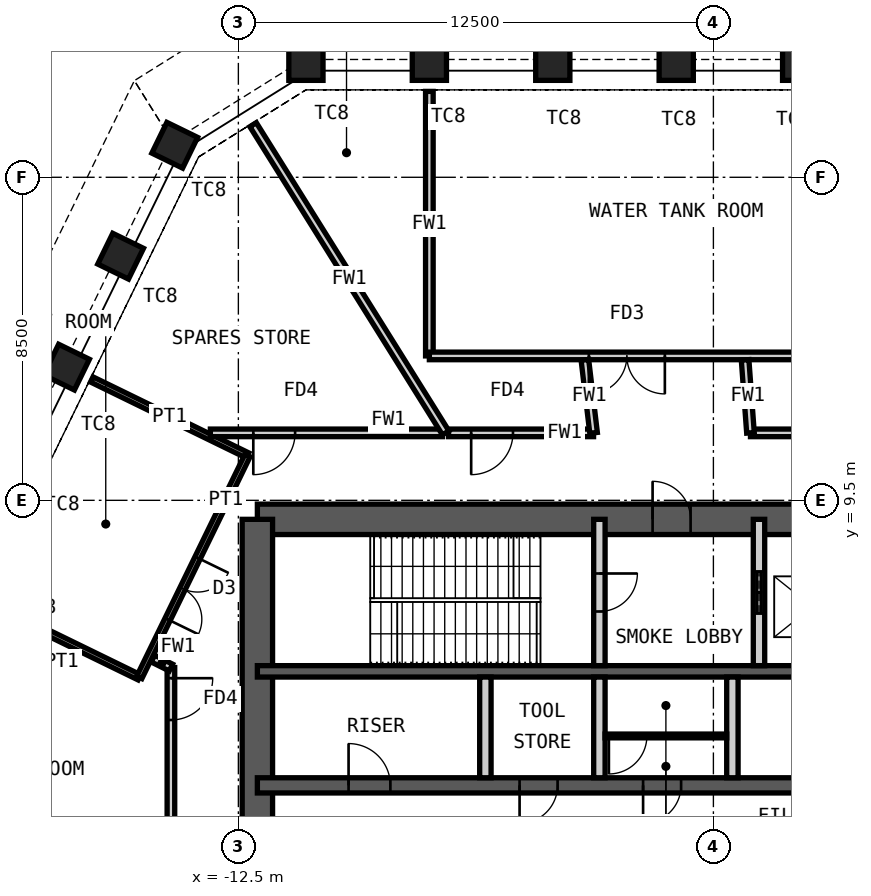
"""IFC4 building model, lengths in metres.
Left out: names, types, materials, properties, quantities, classifications, styles, units other than length and angle.
Written with IfcOpenShell. Run it as: python <this file> out.ifc"""

import sys

from ifc_helpers import new_model, si_unit, direction, frame, frame_2d, origin, origin_2d, place, context, subcontext, project, spatial, rectangle, hollow_rectangle, extrude, element, fill, save


model = new_model("IFC4")
c1 = context("Model", 3, precision=1e-05, world=origin(), true_north=direction((0.0, 1.0)))
c2 = subcontext(c1, "Body", "Model", "MODEL_VIEW")
j1 = project(units=[si_unit("LENGTHUNIT", "METRE"), si_unit("PLANEANGLEUNIT", "RADIAN")], contexts=[c1])
p1 = place(None, origin())
s1 = spatial("IfcSite", under=j1, at=p1, CompositionType="ELEMENT")
p2 = place(p1, origin())
s2 = spatial("IfcBuilding", under=s1, at=p2, CompositionType="ELEMENT")
p3 = place(p2, frame((0.0, 0.0, 337.6)))
s3 = spatial("IfcBuildingStorey", under=s2, at=p3, CompositionType="ELEMENT", Elevation=337.6)
for number, where, z_axis, x_axis in (
    (1, (-10.722, 21.0, 0.0), (0.0, 0.0, 1.0), (-1.0, 0.0, 0.0)),
    (2, (-7.474, 21.0, 0.0), (0.0, 0.0, 1.0), (-1.0, 0.0, 0.0)),
    (3, (-4.226, 21.0, 0.0), (0.0, 0.0, 1.0), (-1.0, 0.0, 0.0)),
    (4, (-0.978, 21.0, 0.0), (0.0, 0.0, 1.0), (-1.0, 0.0, 0.0)),
    (5, (2.27, 21.0, 0.0), (0.0, 0.0, 1.0), (-1.0, 0.0, 0.0)),
    (6, (-17.022, 13.004, 0.0), (0.0, 0.0, 1.0), (-0.438, -0.899, 0.0)),
    (7, (-15.598, 15.924, 0.0), (0.0, 0.0, 1.0), (-0.438, -0.899, 0.0)),
    (8, (-14.174, 18.843, 0.0), (0.0, 0.0, 1.0), (-0.438, -0.899, 0.0)),
):
    element("IfcColumn", number, at=place(p3, frame(where, z_axis=z_axis, x_axis=x_axis)), inside=s3, PredefinedType="COLUMN", context=c2, shape_type="SweptSolid", body=[
        extrude(hollow_rectangle(XDim=0.9, YDim=0.9, WallThickness=0.05, at=origin_2d()), origin(), (0.0, 0.0, 1.0), 6.0),
    ])
p4 = place(p3, frame((-12.0, 9.0, 0.0), z_axis=(0.0, 0.0, 1.0), x_axis=(1.0, 0.0, 0.0)))
e9 = element("IfcWall", 9, at=p4, inside=s3, PredefinedType="SHEAR", context=c2, shape_type="SweptSolid", body=[
    extrude(rectangle(XDim=24.0, YDim=0.8, at=frame_2d((12.0, 0.0))), origin(), (0.0, 0.0, 1.0), 6.0),
])
p5 = place(p4, frame((10.4, 0.0, 0.0)))
e10 = element("IfcOpeningElement", 10, at=p5, cuts=e9, PredefinedType="OPENING", context=c2, shape_type="SweptSolid", body=[
    extrude(rectangle(XDim=1.0, YDim=2.1, at=frame_2d((0.5, 1.05))), frame((0.0, 0.41, 0.0), z_axis=(0.0, -1.0, 0.0), x_axis=(1.0, 0.0, 0.0)), (0.0, 0.0, 1.0), 0.82),
])
p6 = place(p4, frame((17.6, 0.0, 0.0)))
e11 = element("IfcOpeningElement", 11, at=p6, cuts=e9, PredefinedType="OPENING", context=c2, shape_type="SweptSolid", body=[
    extrude(rectangle(XDim=0.9, YDim=2.1, at=frame_2d((0.45, 1.05))), frame((0.0, 0.41, 0.0), z_axis=(0.0, -1.0, 0.0), x_axis=(1.0, 0.0, 0.0)), (0.0, 0.0, 1.0), 0.82),
])
p7 = place(p4, frame((21.9, 0.0, 0.0)))
e12 = element("IfcOpeningElement", 12, at=p7, cuts=e9, PredefinedType="OPENING", context=c2, shape_type="SweptSolid", body=[
    extrude(rectangle(XDim=0.9, YDim=2.1, at=frame_2d((0.45, 1.05))), frame((0.0, 0.41, 0.0), z_axis=(0.0, -1.0, 0.0), x_axis=(1.0, 0.0, 0.0)), (0.0, 0.0, 1.0), 0.82),
])
p8 = place(p3, frame((-12.0, -9.0, 0.0), z_axis=(0.0, 0.0, 1.0), x_axis=(0.0, 1.0, 0.0)))
e13 = element("IfcWall", 13, at=p8, inside=s3, PredefinedType="SHEAR", context=c2, shape_type="SweptSolid", body=[
    extrude(rectangle(XDim=18.0, YDim=0.8, at=frame_2d((9.0, 0.0))), origin(), (0.0, 0.0, 1.0), 6.0),
])
p9 = place(p8, frame((8.1, 0.0, 0.0)))
e14 = element("IfcOpeningElement", 14, at=p9, cuts=e13, PredefinedType="OPENING", context=c2, shape_type="SweptSolid", body=[
    extrude(rectangle(XDim=1.8, YDim=2.1, at=frame_2d((0.9, 1.05))), frame((0.0, 0.41, 0.0), z_axis=(0.0, -1.0, 0.0), x_axis=(1.0, 0.0, 0.0)), (0.0, 0.0, 1.0), 0.82),
])
p10 = place(p3, frame((-12.0, 5.0, 0.0), z_axis=(0.0, 0.0, 1.0), x_axis=(1.0, 0.0, 0.0)))
e15 = element("IfcWall", 15, at=p10, inside=s3, PredefinedType="SHEAR", context=c2, shape_type="SweptSolid", body=[
    extrude(rectangle(XDim=24.0, YDim=0.3, at=frame_2d((12.0, 0.0))), origin(), (0.0, 0.0, 1.0), 6.0),
])
p11 = place(p3, frame((-12.0, 2.0, 0.0), z_axis=(0.0, 0.0, 1.0), x_axis=(1.0, 0.0, 0.0)))
e16 = element("IfcWall", 16, at=p11, inside=s3, PredefinedType="SHEAR", context=c2, shape_type="SweptSolid", body=[
    extrude(rectangle(XDim=24.0, YDim=0.4, at=frame_2d((12.0, 0.0))), origin(), (0.0, 0.0, 1.0), 6.0),
])
p12 = place(p11, frame((2.4, 0.0, 0.0)))
e17 = element("IfcOpeningElement", 17, at=p12, cuts=e16, PredefinedType="OPENING", context=c2, shape_type="SweptSolid", body=[
    extrude(rectangle(XDim=1.1, YDim=2.1, at=frame_2d((0.55, 1.05))), frame((0.0, 0.21, 0.0), z_axis=(0.0, -1.0, 0.0), x_axis=(1.0, 0.0, 0.0)), (0.0, 0.0, 1.0), 0.42),
])
p13 = place(p11, frame((22.0, 0.0, 0.0)))
e18 = element("IfcOpeningElement", 18, at=p13, cuts=e16, PredefinedType="OPENING", context=c2, shape_type="SweptSolid", body=[
    extrude(rectangle(XDim=1.1, YDim=2.1, at=frame_2d((0.55, 1.05))), frame((0.0, 0.21, 0.0), z_axis=(0.0, -1.0, 0.0), x_axis=(1.0, 0.0, 0.0)), (0.0, 0.0, 1.0), 0.42),
])
p14 = place(p11, frame((10.15, 0.0, 0.0)))
e19 = element("IfcOpeningElement", 19, at=p14, cuts=e16, PredefinedType="OPENING", context=c2, shape_type="SweptSolid", body=[
    extrude(rectangle(XDim=1.0, YDim=2.1, at=frame_2d((0.5, 1.05))), frame((0.0, 0.21, 0.0), z_axis=(0.0, -1.0, 0.0), x_axis=(1.0, 0.0, 0.0)), (0.0, 0.0, 1.0), 0.42),
])
p15 = place(p11, frame((6.9, 0.0, 0.0)))
e20 = element("IfcOpeningElement", 20, at=p15, cuts=e16, PredefinedType="OPENING", context=c2, shape_type="SweptSolid", body=[
    extrude(rectangle(XDim=1.0, YDim=2.1, at=frame_2d((0.5, 1.05))), frame((0.0, 0.21, 0.0), z_axis=(0.0, -1.0, 0.0), x_axis=(1.0, 0.0, 0.0)), (0.0, 0.0, 1.0), 0.42),
])
p16 = place(p11, frame((19.0, 0.0, 0.0)))
e21 = element("IfcOpeningElement", 21, at=p16, cuts=e16, PredefinedType="OPENING", context=c2, shape_type="SweptSolid", body=[
    extrude(rectangle(XDim=1.0, YDim=2.1, at=frame_2d((0.5, 1.05))), frame((0.0, 0.21, 0.0), z_axis=(0.0, -1.0, 0.0), x_axis=(1.0, 0.0, 0.0)), (0.0, 0.0, 1.0), 0.42),
])
p17 = place(p3, frame((-3.0, 5.15, 0.0), z_axis=(0.0, 0.0, 1.0), x_axis=(0.0, 1.0, 0.0)))
e22 = element("IfcWall", 22, at=p17, inside=s3, PredefinedType="PARTITIONING", context=c2, shape_type="SweptSolid", body=[
    extrude(rectangle(XDim=3.85, YDim=0.3, at=frame_2d((1.925, 0.0))), origin(), (0.0, 0.0, 1.0), 5.78),
])
p18 = place(p17, frame((1.425, 0.0, 0.0)))
e23 = element("IfcOpeningElement", 23, at=p18, cuts=e22, PredefinedType="OPENING", context=c2, shape_type="SweptSolid", body=[
    extrude(rectangle(XDim=1.0, YDim=2.1, at=frame_2d((0.5, 1.05))), frame((0.0, 0.16, 0.0), z_axis=(0.0, -1.0, 0.0), x_axis=(1.0, 0.0, 0.0)), (0.0, 0.0, 1.0), 0.32),
])
p19 = place(p3, frame((1.2, 5.15, 0.0), z_axis=(0.0, 0.0, 1.0), x_axis=(0.0, 1.0, 0.0)))
e24 = element("IfcWall", 24, at=p19, inside=s3, PredefinedType="PARTITIONING", context=c2, shape_type="SweptSolid", body=[
    extrude(rectangle(XDim=3.85, YDim=0.3, at=frame_2d((1.925, 0.0))), origin(), (0.0, 0.0, 1.0), 5.78),
])
p20 = place(p19, frame((1.375, 0.0, 0.0)))
e25 = element("IfcOpeningElement", 25, at=p20, cuts=e24, PredefinedType="OPENING", context=c2, shape_type="SweptSolid", body=[
    extrude(rectangle(XDim=1.1, YDim=2.4, at=frame_2d((0.55, 1.2))), frame((0.0, 0.16, 0.0), z_axis=(0.0, -1.0, 0.0), x_axis=(1.0, 0.0, 0.0)), (0.0, 0.0, 1.0), 0.32),
])
for number, where, z_axis, x_axis in (
    (26, (-6.0, 2.2, 0.0), (0.0, 0.0, 1.0), (0.0, 1.0, 0.0)),
    (27, (-3.0, 2.2, 0.0), (0.0, 0.0, 1.0), (0.0, 1.0, 0.0)),
    (28, (0.5, 2.2, 0.0), (0.0, 0.0, 1.0), (0.0, 1.0, 0.0)),
):
    element("IfcWall", number, at=place(p3, frame(where, z_axis=z_axis, x_axis=x_axis)), inside=s3, PredefinedType="PARTITIONING", context=c2, shape_type="SweptSolid", body=[
        extrude(rectangle(XDim=2.65, YDim=0.3, at=frame_2d((1.325, 0.0))), origin(), (0.0, 0.0, 1.0), 5.78),
    ])
p21 = place(p3, frame((-2.85, 3.3, 0.0), z_axis=(0.0, 0.0, 1.0), x_axis=(1.0, 0.0, 0.0)))
e29 = element("IfcWall", 29, at=p21, inside=s3, PredefinedType="PARTITIONING", context=c2, shape_type="SweptSolid", body=[
    extrude(rectangle(XDim=3.2, YDim=0.1, at=frame_2d((1.6, 0.0))), origin(), (0.0, 0.0, 1.0), 5.78),
])
p22 = place(p21, frame((0.1, 0.0, 0.0)))
e30 = element("IfcOpeningElement", 30, at=p22, cuts=e29, PredefinedType="OPENING", context=c2, shape_type="SweptSolid", body=[
    extrude(rectangle(XDim=1.0, YDim=2.4, at=frame_2d((0.5, 1.2))), frame((0.0, 0.06, 0.0), z_axis=(0.0, -1.0, 0.0), x_axis=(1.0, 0.0, 0.0)), (0.0, 0.0, 1.0), 0.12),
])
p23 = place(p3, frame((-7.474, 20.26, 0.0), z_axis=(0.0, 0.0, 1.0), x_axis=(0.0, -1.0, 0.0)))
e31 = element("IfcWall", 31, at=p23, inside=s3, PredefinedType="PARTITIONING", context=c2, shape_type="SweptSolid", body=[
    extrude(rectangle(XDim=6.96, YDim=0.2, at=frame_2d((3.48, 0.0))), origin(), (0.0, 0.0, 1.0), 5.75),
])
p24 = place(p3, frame((-7.474, 13.3, 0.0), z_axis=(0.0, 0.0, 1.0), x_axis=(1.0, 0.0, 0.0)))
e32 = element("IfcWall", 32, at=p24, inside=s3, PredefinedType="PARTITIONING", context=c2, shape_type="SweptSolid", body=[
    extrude(rectangle(XDim=12.992, YDim=0.2, at=frame_2d((6.496, 0.0))), origin(), (0.0, 0.0, 1.0), 5.75),
])
p25 = place(p24, frame((4.197, 0.0, 0.0)))
e33 = element("IfcOpeningElement", 33, at=p25, cuts=e32, PredefinedType="OPENING", context=c2, shape_type="SweptSolid", body=[
    extrude(rectangle(XDim=2.0, YDim=2.4, at=frame_2d((1.0, 1.2))), frame((0.0, 0.11, 0.0), z_axis=(0.0, -1.0, 0.0), x_axis=(1.0, 0.0, 0.0)), (0.0, 0.0, 1.0), 0.22),
])
p26 = place(p3, frame((-19.205, 6.841, 0.0), z_axis=(0.0, 0.0, 1.0), x_axis=(0.898784911103, -0.438389876221, 0.0)))
e34 = element("IfcWall", 34, at=p26, inside=s3, PredefinedType="PARTITIONING", context=c2, shape_type="SweptSolid", body=[
    extrude(rectangle(XDim=4.56, YDim=0.15, at=frame_2d((2.28, 0.0))), origin(), (0.0, 0.0, 1.0), 4.65),
])
p27 = place(p3, frame((-16.357, 12.68, 0.0), z_axis=(0.0, 0.0, 1.0), x_axis=(0.898795200085, -0.438368781171, 0.0)))
e35 = element("IfcWall", 35, at=p27, inside=s3, PredefinedType="PARTITIONING", context=c2, shape_type="SweptSolid", body=[
    extrude(rectangle(XDim=4.56, YDim=0.15, at=frame_2d((2.28, 0.0))), origin(), (0.0, 0.0, 1.0), 4.85),
])
p28 = place(p3, frame((-15.106, 4.842, 0.0), z_axis=(0.0, 0.0, 1.0), x_axis=(0.438397716114, 0.898781087087, 0.0)))
e36 = element("IfcWall", 36, at=p28, inside=s3, PredefinedType="PARTITIONING", context=c2, shape_type="SweptSolid", body=[
    extrude(rectangle(XDim=6.496, YDim=0.15, at=frame_2d((3.248, 0.0))), origin(), (0.0, 0.0, 1.0), 5.75),
])
p29 = place(p28, frame((1.698, 0.0, 0.0)))
e37 = element("IfcOpeningElement", 37, at=p29, cuts=e36, PredefinedType="OPENING", context=c2, shape_type="SweptSolid", body=[
    extrude(rectangle(XDim=1.8, YDim=2.4, at=frame_2d((0.9, 1.2))), frame((0.0, 0.085, 0.0), z_axis=(0.0, -1.0, 0.0), x_axis=(1.0, 0.0, 0.0)), (0.0, 0.0, 1.0), 0.17),
])
p30 = place(p3, frame((0.976, 11.275, 0.0), z_axis=(0.0, 0.0, 1.0), x_axis=(1.0, 0.0, 0.0)))
e38 = element("IfcWall", 38, at=p30, inside=s3, PredefinedType="PARTITIONING", context=c2, shape_type="SweptSolid", body=[
    extrude(rectangle(XDim=4.946, YDim=0.2, at=frame_2d((2.473, 0.0))), origin(), (0.0, 0.0, 1.0), 5.75),
])
p31 = place(p30, frame((1.428, 0.0, 0.0)))
e39 = element("IfcOpeningElement", 39, at=p31, cuts=e38, PredefinedType="OPENING", context=c2, shape_type="SweptSolid", body=[
    extrude(rectangle(XDim=1.1, YDim=2.1, at=frame_2d((0.55, 1.05))), frame((0.0, 0.11, 0.0), z_axis=(0.0, -1.0, 0.0), x_axis=(1.0, 0.0, 0.0)), (0.0, 0.0, 1.0), 0.22),
])
p32 = place(p3, frame((0.834, 13.195, 0.0), z_axis=(0.0, 0.0, 1.0), x_axis=(0.073292493621, -0.997310488453, 0.0)))
e40 = element("IfcWall", 40, at=p32, inside=s3, PredefinedType="PARTITIONING", context=c2, shape_type="SweptSolid", body=[
    extrude(rectangle(XDim=1.925, YDim=0.2, at=frame_2d((0.963, 0.0))), origin(), (0.0, 0.0, 1.0), 4.65),
])
p33 = place(p3, frame((-6.969, 11.275, 0.0), z_axis=(0.0, 0.0, 1.0), x_axis=(1.0, 0.0, 0.0)))
e41 = element("IfcWall", 41, at=p33, inside=s3, PredefinedType="PARTITIONING", context=c2, shape_type="SweptSolid", body=[
    extrude(rectangle(XDim=3.816, YDim=0.2, at=frame_2d((1.908, 0.0))), origin(), (0.0, 0.0, 1.0), 5.75),
])
p34 = place(p33, frame((0.595, 0.0, 0.0)))
e42 = element("IfcOpeningElement", 42, at=p34, cuts=e41, PredefinedType="OPENING", context=c2, shape_type="SweptSolid", body=[
    extrude(rectangle(XDim=1.1, YDim=2.1, at=frame_2d((0.55, 1.05))), frame((0.0, 0.11, 0.0), z_axis=(0.0, -1.0, 0.0), x_axis=(1.0, 0.0, 0.0)), (0.0, 0.0, 1.0), 0.22),
])
p35 = place(p3, frame((-3.153, 11.275, 0.0), z_axis=(0.0, 0.0, 1.0), x_axis=(-0.118049862702, 0.993007668609, 0.0)))
e43 = element("IfcWall", 43, at=p35, inside=s3, PredefinedType="PARTITIONING", context=c2, shape_type="SweptSolid", body=[
    extrude(rectangle(XDim=1.934, YDim=0.2, at=frame_2d((0.967, 0.0))), origin(), (0.0, 0.0, 1.0), 4.85),
])
p36 = place(p3, frame((-13.237, 11.275, 0.0), z_axis=(0.0, 0.0, 1.0), x_axis=(1.0, 0.0, 0.0)))
e44 = element("IfcWall", 44, at=p36, inside=s3, PredefinedType="PARTITIONING", context=c2, shape_type="SweptSolid", body=[
    extrude(rectangle(XDim=6.109, YDim=0.2, at=frame_2d((3.054, 0.0))), origin(), (0.0, 0.0, 1.0), 5.75),
])
p37 = place(p36, frame((1.13, 0.0, 0.0)))
e45 = element("IfcOpeningElement", 45, at=p37, cuts=e44, PredefinedType="OPENING", context=c2, shape_type="SweptSolid", body=[
    extrude(rectangle(XDim=1.1, YDim=2.1, at=frame_2d((0.55, 1.05))), frame((0.0, 0.11, 0.0), z_axis=(0.0, -1.0, 0.0), x_axis=(1.0, 0.0, 0.0)), (0.0, 0.0, 1.0), 0.22),
])
p38 = place(p3, frame((-14.275, -0.432, 0.0), z_axis=(0.0, 0.0, 1.0), x_axis=(0.0, 1.0, 0.0)))
e46 = element("IfcWall", 46, at=p38, inside=s3, PredefinedType="PARTITIONING", context=c2, shape_type="SweptSolid", body=[
    extrude(rectangle(XDim=5.532, YDim=0.2, at=frame_2d((2.766, 0.0))), origin(), (0.0, 0.0, 1.0), 5.75),
])
p39 = place(p38, frame((4.152, 0.0, 0.0)))
e47 = element("IfcOpeningElement", 47, at=p39, cuts=e46, PredefinedType="OPENING", context=c2, shape_type="SweptSolid", body=[
    extrude(rectangle(XDim=1.1, YDim=2.1, at=frame_2d((0.55, 1.05))), frame((0.0, 0.11, 0.0), z_axis=(0.0, -1.0, 0.0), x_axis=(1.0, 0.0, 0.0)), (0.0, 0.0, 1.0), 0.22),
])
p40 = place(p3, frame((-14.275, 5.1, 0.0), z_axis=(0.0, 0.0, 1.0), x_axis=(-0.894980101655, 0.446106060979, 0.0)))
e48 = element("IfcWall", 48, at=p40, inside=s3, PredefinedType="PARTITIONING", context=c2, shape_type="SweptSolid", body=[
    extrude(rectangle(XDim=0.529, YDim=0.2, at=frame_2d((0.265, 0.0))), origin(), (0.0, 0.0, 1.0), 4.65),
])
p41 = place(p3, frame((-7.045, 11.275, 0.0), z_axis=(0.0, 0.0, 1.0), x_axis=(-0.529918611936, 0.848048503756, 0.0)))
e49 = element("IfcWall", 49, at=p41, inside=s3, PredefinedType="PARTITIONING", context=c2, shape_type="SweptSolid", body=[
    extrude(rectangle(XDim=9.562, YDim=0.2, at=frame_2d((4.781, 0.0))), origin(), (0.0, 0.0, 1.0), 5.75),
])
p42 = place(p5, origin())
e50 = element("IfcDoor", 50, at=p42, inside=s3, OperationType="SINGLE_SWING_RIGHT", PredefinedType="DOOR", context=c2, shape_type="SweptSolid", body=[
    extrude(rectangle(XDim=1.0, YDim=2.1, at=frame_2d((0.5, 1.05))), frame((0.0, 0.025, 0.0), z_axis=(0.0, -1.0, 0.0), x_axis=(1.0, 0.0, 0.0)), (0.0, 0.0, 1.0), 0.05),
])
fill(e10, e50)
p43 = place(p18, origin())
e51 = element("IfcDoor", 51, at=p43, inside=s3, OperationType="SINGLE_SWING_RIGHT", PredefinedType="DOOR", context=c2, shape_type="SweptSolid", body=[
    extrude(rectangle(XDim=1.0, YDim=2.1, at=frame_2d((0.5, 1.05))), frame((0.0, 0.025, 0.0), z_axis=(0.0, -1.0, 0.0), x_axis=(1.0, 0.0, 0.0)), (0.0, 0.0, 1.0), 0.05),
])
fill(e23, e51)
p44 = place(p12, origin())
e52 = element("IfcDoor", 52, at=p44, inside=s3, OperationType="SINGLE_SWING_RIGHT", PredefinedType="DOOR", context=c2, shape_type="SweptSolid", body=[
    extrude(rectangle(XDim=1.1, YDim=2.1, at=frame_2d((0.55, 1.05))), frame((0.0, 0.025, 0.0), z_axis=(0.0, -1.0, 0.0), x_axis=(1.0, 0.0, 0.0)), (0.0, 0.0, 1.0), 0.05),
])
fill(e17, e52)
p45 = place(p14, origin())
e53 = element("IfcDoor", 53, at=p45, inside=s3, OperationType="SINGLE_SWING_LEFT", PredefinedType="DOOR", context=c2, shape_type="SweptSolid", body=[
    extrude(rectangle(XDim=1.0, YDim=2.1, at=frame_2d((0.5, 1.05))), frame((0.0, 0.025, 0.0), z_axis=(0.0, -1.0, 0.0), x_axis=(1.0, 0.0, 0.0)), (0.0, 0.0, 1.0), 0.05),
])
fill(e19, e53)
p46 = place(p20, origin())
e54 = element("IfcDoor", 54, at=p46, inside=s3, OperationType="DOUBLE_DOOR_SLIDING", PredefinedType="DOOR", context=c2, shape_type="SweptSolid", body=[
    extrude(rectangle(XDim=1.1, YDim=2.4, at=frame_2d((0.55, 1.2))), frame((0.0, 0.025, 0.0), z_axis=(0.0, -1.0, 0.0), x_axis=(1.0, 0.0, 0.0)), (0.0, 0.0, 1.0), 0.05),
])
fill(e25, e54)
p47 = place(p15, origin())
e55 = element("IfcDoor", 55, at=p47, inside=s3, OperationType="SINGLE_SWING_LEFT", PredefinedType="DOOR", context=c2, shape_type="SweptSolid", body=[
    extrude(rectangle(XDim=1.0, YDim=2.1, at=frame_2d((0.5, 1.05))), frame((0.0, 0.025, 0.0), z_axis=(0.0, -1.0, 0.0), x_axis=(1.0, 0.0, 0.0)), (0.0, 0.0, 1.0), 0.05),
])
fill(e20, e55)
p48 = place(p22, origin())
e56 = element("IfcDoor", 56, at=p48, inside=s3, OperationType="SINGLE_SWING_LEFT", PredefinedType="DOOR", context=c2, shape_type="SweptSolid", body=[
    extrude(rectangle(XDim=1.0, YDim=2.4, at=frame_2d((0.5, 1.2))), frame((0.0, 0.025, 0.0), z_axis=(0.0, -1.0, 0.0), x_axis=(1.0, 0.0, 0.0)), (0.0, 0.0, 1.0), 0.05),
])
fill(e30, e56)
p49 = place(p25, origin())
e57 = element("IfcDoor", 57, at=p49, inside=s3, OperationType="DOUBLE_DOOR_DOUBLE_SWING", PredefinedType="DOOR", context=c2, shape_type="SweptSolid", body=[
    extrude(rectangle(XDim=2.0, YDim=2.4, at=frame_2d((1.0, 1.2))), frame((0.0, 0.025, 0.0), z_axis=(0.0, -1.0, 0.0), x_axis=(1.0, 0.0, 0.0)), (0.0, 0.0, 1.0), 0.05),
])
fill(e33, e57)
p50 = place(p29, origin())
e58 = element("IfcDoor", 58, at=p50, inside=s3, OperationType="DOUBLE_DOOR_DOUBLE_SWING", PredefinedType="DOOR", context=c2, shape_type="SweptSolid", body=[
    extrude(rectangle(XDim=1.8, YDim=2.4, at=frame_2d((0.9, 1.2))), frame((0.0, 0.025, 0.0), z_axis=(0.0, -1.0, 0.0), x_axis=(1.0, 0.0, 0.0)), (0.0, 0.0, 1.0), 0.05),
])
fill(e37, e58)
p51 = place(p34, origin())
e59 = element("IfcDoor", 59, at=p51, inside=s3, OperationType="SINGLE_SWING_LEFT", PredefinedType="DOOR", context=c2, shape_type="SweptSolid", body=[
    extrude(rectangle(XDim=1.1, YDim=2.1, at=frame_2d((0.55, 1.05))), frame((0.0, 0.025, 0.0), z_axis=(0.0, -1.0, 0.0), x_axis=(1.0, 0.0, 0.0)), (0.0, 0.0, 1.0), 0.05),
])
fill(e42, e59)
p52 = place(p37, origin())
e60 = element("IfcDoor", 60, at=p52, inside=s3, OperationType="SINGLE_SWING_LEFT", PredefinedType="DOOR", context=c2, shape_type="SweptSolid", body=[
    extrude(rectangle(XDim=1.1, YDim=2.1, at=frame_2d((0.55, 1.05))), frame((0.0, 0.025, 0.0), z_axis=(0.0, -1.0, 0.0), x_axis=(1.0, 0.0, 0.0)), (0.0, 0.0, 1.0), 0.05),
])
fill(e45, e60)
p53 = place(p39, origin())
e61 = element("IfcDoor", 61, at=p53, inside=s3, OperationType="SINGLE_SWING_RIGHT", PredefinedType="DOOR", context=c2, shape_type="SweptSolid", body=[
    extrude(rectangle(XDim=1.1, YDim=2.1, at=frame_2d((0.55, 1.05))), frame((0.0, 0.025, 0.0), z_axis=(0.0, -1.0, 0.0), x_axis=(1.0, 0.0, 0.0)), (0.0, 0.0, 1.0), 0.05),
])
fill(e47, e61)
save(model, sys.argv[1])
